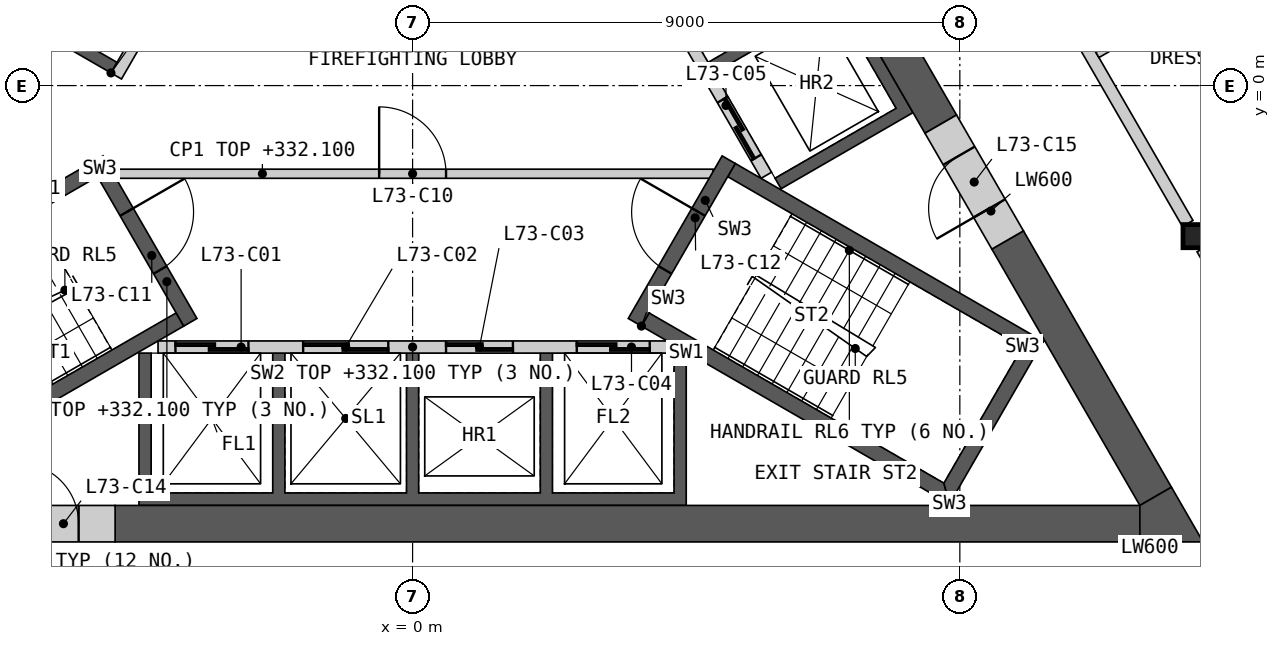
"""IFC4 building model, lengths in metres.
Left out: names, types, materials, properties, quantities, classifications, styles, units other than length and angle.
Written with IfcOpenShell. Run it as: python <this file> out.ifc"""

import sys

from ifc_helpers import new_model, si_unit, direction, frame, frame_2d, origin, origin_2d, place, context, subcontext, project, spatial, polyline, rectangle, i_section, outline, extrude, element, fill, save


model = new_model("IFC4")
c1 = context("Model", 3, precision=1e-05, world=origin(), true_north=direction((0.0, 1.0)))
c2 = subcontext(c1, "Body", "Model", "MODEL_VIEW")
j1 = project(units=[si_unit("LENGTHUNIT", "METRE"), si_unit("PLANEANGLEUNIT", "RADIAN")], contexts=[c1])
p1 = place(None, origin())
s1 = spatial("IfcSite", under=j1, at=p1, CompositionType="ELEMENT")
p2 = place(p1, origin())
s2 = spatial("IfcBuilding", under=s1, at=p2, CompositionType="ELEMENT")
p3 = place(p2, frame((0.0, 0.0, 329.0)))
s3 = spatial("IfcBuildingStorey", under=s2, at=p3, CompositionType="ELEMENT", Elevation=329.0)
p4 = place(p3, frame((12.868, -2.476, 0.0), z_axis=(0.0, 0.0, 1.0), x_axis=(1.0, 0.0, 0.0)))
e1 = element("IfcColumn", 1, at=p4, inside=s3, PredefinedType="COLUMN", context=c2, shape_type="SweptSolid", body=[
    extrude(i_section(OverallWidth=0.396, OverallDepth=0.381, WebThickness=0.019, FlangeThickness=0.03, at=origin_2d()), origin(), (0.0, 0.0, 1.0), 3.4),
])
p5 = place(p3, origin())
e2 = element("IfcWall", 2, at=p5, inside=s3, PredefinedType="SHEAR", context=c2, shape_type="SweptSolid", body=[
    extrude(outline(polyline([(4.5, -4.4), (4.5, -6.906), (-4.5, -6.906), (-4.5, -4.4), (-4.3, -4.4), (-4.3, -6.7), (-2.3, -6.7), (-2.3, -4.4), (-2.1, -4.4), (-2.1, -6.7), (-0.1, -6.7), (-0.1, -4.4), (0.1, -4.4), (0.1, -6.7), (2.1, -6.7), (2.1, -4.4), (2.3, -4.4), (2.3, -6.7), (4.3, -6.7), (4.3, -4.4), (4.5, -4.4)])), origin(), (0.0, 0.0, 1.0), 3.1),
])
p6 = place(p3, frame((-4.187, -4.3, 0.0), z_axis=(0.0, 0.0, 1.0), x_axis=(1.0, 0.0, 0.0)))
e3 = element("IfcWall", 3, at=p6, inside=s3, PredefinedType="SOLIDWALL", context=c2, shape_type="SweptSolid", body=[
    extrude(rectangle(XDim=8.373, YDim=0.2, at=frame_2d((4.187, 0.0))), origin(), (0.0, 0.0, 1.0), 3.1),
])
p7 = place(p6, frame((0.287, 0.0, 0.0)))
e4 = element("IfcOpeningElement", 4, at=p7, cuts=e3, PredefinedType="OPENING", context=c2, shape_type="SweptSolid", body=[
    extrude(rectangle(XDim=1.2, YDim=2.1, at=frame_2d((0.6, 1.05))), frame((0.0, 0.11, 0.0), z_axis=(0.0, -1.0, 0.0), x_axis=(1.0, 0.0, 0.0)), (0.0, 0.0, 1.0), 0.22),
])
p8 = place(p6, frame((2.387, 0.0, 0.0)))
e5 = element("IfcOpeningElement", 5, at=p8, cuts=e3, PredefinedType="OPENING", context=c2, shape_type="SweptSolid", body=[
    extrude(rectangle(XDim=1.4, YDim=2.1, at=frame_2d((0.7, 1.05))), frame((0.0, 0.11, 0.0), z_axis=(0.0, -1.0, 0.0), x_axis=(1.0, 0.0, 0.0)), (0.0, 0.0, 1.0), 0.22),
])
p9 = place(p6, frame((4.737, 0.0, 0.0)))
e6 = element("IfcOpeningElement", 6, at=p9, cuts=e3, PredefinedType="OPENING", context=c2, shape_type="SweptSolid", body=[
    extrude(rectangle(XDim=1.1, YDim=2.1, at=frame_2d((0.55, 1.05))), frame((0.0, 0.11, 0.0), z_axis=(0.0, -1.0, 0.0), x_axis=(1.0, 0.0, 0.0)), (0.0, 0.0, 1.0), 0.22),
])
p10 = place(p6, frame((6.887, 0.0, 0.0)))
e7 = element("IfcOpeningElement", 7, at=p10, cuts=e3, PredefinedType="OPENING", context=c2, shape_type="SweptSolid", body=[
    extrude(rectangle(XDim=1.2, YDim=2.1, at=frame_2d((0.6, 1.05))), frame((0.0, 0.11, 0.0), z_axis=(0.0, -1.0, 0.0), x_axis=(1.0, 0.0, 0.0)), (0.0, 0.0, 1.0), 0.22),
])
p11 = place(p3, origin())
e8 = element("IfcWall", 8, at=p11, inside=s3, PredefinedType="SHEAR", context=c2, shape_type="SweptSolid", body=[
    extrude(outline(polyline([(1.561, 6.097), (3.731, 7.35), (8.231, -0.444), (6.061, -1.697), (5.96, -1.524), (7.952, -0.374), (6.952, 1.358), (4.96, 0.208), (4.861, 0.381), (6.852, 1.531), (5.852, 3.263), (3.861, 2.113), (3.76, 2.287), (5.752, 3.437), (4.752, 5.169), (2.76, 4.019), (2.66, 4.192), (4.652, 5.342), (3.652, 7.074), (1.66, 5.924), (1.561, 6.097)])), origin(), (0.0, 0.0, 1.0), 3.1),
])
p12 = place(p3, frame((5.817, -1.476, 0.0), z_axis=(0.0, 0.0, 1.0), x_axis=(-0.500002616675, 0.866023893041, 0.0)))
e9 = element("IfcWall", 9, at=p12, inside=s3, PredefinedType="SOLIDWALL", context=c2, shape_type="SweptSolid", body=[
    extrude(rectangle(XDim=8.373, YDim=0.2, at=frame_2d((4.187, 0.0))), origin(), (0.0, 0.0, 1.0), 3.1),
])
p13 = place(p12, frame((0.337, 0.0, 0.0)))
e10 = element("IfcOpeningElement", 10, at=p13, cuts=e9, PredefinedType="OPENING", context=c2, shape_type="SweptSolid", body=[
    extrude(rectangle(XDim=1.1, YDim=2.1, at=frame_2d((0.55, 1.05))), frame((0.0, 0.11, 0.0), z_axis=(0.0, -1.0, 0.0), x_axis=(1.0, 0.0, 0.0)), (0.0, 0.0, 1.0), 0.22),
])
p14 = place(p12, frame((2.537, 0.0, 0.0)))
e11 = element("IfcOpeningElement", 11, at=p14, cuts=e9, PredefinedType="OPENING", context=c2, shape_type="SweptSolid", body=[
    extrude(rectangle(XDim=1.1, YDim=2.1, at=frame_2d((0.55, 1.05))), frame((0.0, 0.11, 0.0), z_axis=(0.0, -1.0, 0.0), x_axis=(1.0, 0.0, 0.0)), (0.0, 0.0, 1.0), 0.22),
])
p15 = place(p12, frame((4.737, 0.0, 0.0)))
e12 = element("IfcOpeningElement", 12, at=p15, cuts=e9, PredefinedType="OPENING", context=c2, shape_type="SweptSolid", body=[
    extrude(rectangle(XDim=1.1, YDim=2.1, at=frame_2d((0.55, 1.05))), frame((0.0, 0.11, 0.0), z_axis=(0.0, -1.0, 0.0), x_axis=(1.0, 0.0, 0.0)), (0.0, 0.0, 1.0), 0.22),
])
p16 = place(p12, frame((7.037, 0.0, 0.0)))
e13 = element("IfcOpeningElement", 13, at=p16, cuts=e9, PredefinedType="OPENING", context=c2, shape_type="SweptSolid", body=[
    extrude(rectangle(XDim=0.9, YDim=2.1, at=frame_2d((0.45, 1.05))), frame((0.0, 0.11, 0.0), z_axis=(0.0, -1.0, 0.0), x_axis=(1.0, 0.0, 0.0)), (0.0, 0.0, 1.0), 0.22),
])
p17 = place(p3, origin())
e14 = element("IfcWall", 14, at=p17, inside=s3, PredefinedType="SHEAR", context=c2, shape_type="SweptSolid", body=[
    extrude(outline(polyline([(-4.96, 0.208), (-7.131, 1.461), (-3.731, 7.35), (-1.561, 6.097), (-1.66, 5.924), (-3.652, 7.074), (-6.852, 1.531), (-4.861, 0.381), (-4.96, 0.208)])), origin(), (0.0, 0.0, 1.0), 3.1),
])
p18 = place(p3, frame((-1.631, 5.776, 0.0), z_axis=(0.0, 0.0, 1.0), x_axis=(-0.499992876559, -0.866029516466, 0.0)))
e15 = element("IfcWall", 15, at=p18, inside=s3, PredefinedType="SOLIDWALL", context=c2, shape_type="SweptSolid", body=[
    extrude(rectangle(XDim=6.486, YDim=0.2, at=frame_2d((3.243, 0.0))), origin(), (0.0, 0.0, 1.0), 3.1),
])
p19 = place(p18, frame((2.637, 0.0, 0.0)))
e16 = element("IfcOpeningElement", 16, at=p19, cuts=e15, PredefinedType="OPENING", context=c2, shape_type="SweptSolid", body=[
    extrude(rectangle(XDim=0.9, YDim=2.1, at=frame_2d((0.45, 1.05))), frame((0.0, 0.11, 0.0), z_axis=(0.0, -1.0, 0.0), x_axis=(1.0, 0.0, 0.0)), (0.0, 0.0, 1.0), 0.22),
])
p20 = place(p3, frame((-4.941, -1.45, 0.0), z_axis=(0.0, 0.0, 1.0), x_axis=(1.0, 0.0, 0.0)))
e17 = element("IfcWall", 17, at=p20, inside=s3, PredefinedType="PARTITIONING", context=c2, shape_type="SweptSolid", body=[
    extrude(rectangle(XDim=9.882, YDim=0.15, at=frame_2d((4.941, 0.0))), origin(), (0.0, 0.0, 1.0), 3.1),
])
p21 = place(p20, frame((4.391, 0.0, 0.0)))
e18 = element("IfcOpeningElement", 18, at=p21, cuts=e17, PredefinedType="OPENING", context=c2, shape_type="SweptSolid", body=[
    extrude(rectangle(XDim=1.1, YDim=2.1, at=frame_2d((0.55, 1.05))), frame((0.0, 0.085, 0.0), z_axis=(0.0, -1.0, 0.0), x_axis=(1.0, 0.0, 0.0)), (0.0, 0.0, 1.0), 0.17),
])
p22 = place(p3, origin())
e19 = element("IfcWall", 19, at=p22, inside=s3, PredefinedType="SHEAR", context=c2, shape_type="SweptSolid", body=[
    extrude(outline(polyline([(-5.307, -1.281), (-10.374, -4.206), (-10.032, -4.298), (-5.182, -1.498), (-5.307, -1.281)])), origin(), (0.0, 0.0, 1.0), 3.1),
])
p23 = place(p3, origin())
e20 = element("IfcWall", 20, at=p23, inside=s3, PredefinedType="SHEAR", context=c2, shape_type="SweptSolid", body=[
    extrude(outline(polyline([(-8.738, -6.539), (-8.83, -6.881), (-3.763, -3.956), (-3.888, -3.739), (-8.738, -6.539)])), origin(), (0.0, 0.0, 1.0), 3.1),
])
p24 = place(p3, frame((-5.199, -1.219, 0.0), z_axis=(0.0, 0.0, 1.0), x_axis=(0.499982516597, -0.866035497597, 0.0)))
e21 = element("IfcWall", 21, at=p24, inside=s3, PredefinedType="SHEAR", context=c2, shape_type="SweptSolid", body=[
    extrude(rectangle(XDim=3.088, YDim=0.25, at=frame_2d((1.544, 0.0))), origin(), (0.0, 0.0, 1.0), 3.1),
])
p25 = place(p24, frame((0.994, 0.0, 0.0)))
e22 = element("IfcOpeningElement", 22, at=p25, cuts=e21, PredefinedType="OPENING", context=c2, shape_type="SweptSolid", body=[
    extrude(rectangle(XDim=1.1, YDim=2.1, at=frame_2d((0.55, 1.05))), frame((0.0, 0.135, 0.0), z_axis=(0.0, -1.0, 0.0), x_axis=(1.0, 0.0, 0.0)), (0.0, 0.0, 1.0), 0.27),
])
p26 = place(p3, origin())
e23 = element("IfcWall", 23, at=p26, inside=s3, PredefinedType="SHEAR", context=c2, shape_type="SweptSolid", body=[
    extrude(outline(polyline([(3.763, -3.956), (8.83, -6.881), (8.738, -6.539), (3.888, -3.739), (3.763, -3.956)])), origin(), (0.0, 0.0, 1.0), 3.1),
])
p27 = place(p3, origin())
e24 = element("IfcWall", 24, at=p27, inside=s3, PredefinedType="SHEAR", context=c2, shape_type="SweptSolid", body=[
    extrude(outline(polyline([(8.83, -6.881), (10.374, -4.206), (10.032, -4.298), (8.738, -6.539), (8.83, -6.881)])), origin(), (0.0, 0.0, 1.0), 3.1),
])
p28 = place(p3, origin())
e25 = element("IfcWall", 25, at=p28, inside=s3, PredefinedType="SHEAR", context=c2, shape_type="SweptSolid", body=[
    extrude(outline(polyline([(10.032, -4.298), (10.374, -4.206), (5.307, -1.281), (5.182, -1.498), (10.032, -4.298)])), origin(), (0.0, 0.0, 1.0), 3.1),
])
p29 = place(p3, frame((3.655, -3.893, 0.0), z_axis=(0.0, 0.0, 1.0), x_axis=(0.499982516597, 0.866035497597, 0.0)))
e26 = element("IfcWall", 26, at=p29, inside=s3, PredefinedType="SHEAR", context=c2, shape_type="SweptSolid", body=[
    extrude(rectangle(XDim=3.088, YDim=0.25, at=frame_2d((1.544, 0.0))), origin(), (0.0, 0.0, 1.0), 3.1),
])
p30 = place(p29, frame((0.994, 0.0, 0.0)))
e27 = element("IfcOpeningElement", 27, at=p30, cuts=e26, PredefinedType="OPENING", context=c2, shape_type="SweptSolid", body=[
    extrude(rectangle(XDim=1.1, YDim=2.1, at=frame_2d((0.55, 1.05))), frame((0.0, 0.135, 0.0), z_axis=(0.0, -1.0, 0.0), x_axis=(1.0, 0.0, 0.0)), (0.0, 0.0, 1.0), 0.27),
])
for number, where, z_axis, x_axis in (
    (28, (-4.892, -7.206, 0.0), (0.0, 0.0, 1.0), (1.0, 0.0, 0.0)),
    (29, (8.686, -0.634, 0.0), (0.0, 0.0, 1.0), (-0.5, 0.866, 0.0)),
):
    element("IfcWall", number, at=place(p3, frame(where, z_axis=z_axis, x_axis=x_axis)), inside=s3, PredefinedType="SHEAR", context=c2, shape_type="SweptSolid", body=[
        extrude(rectangle(XDim=16.853, YDim=0.6, at=frame_2d((8.426, 0.0))), origin(), (0.0, 0.0, 1.0), 3.1),
    ])
p31 = place(p3, frame((12.221, -6.756, 0.0), z_axis=(0.0, 0.0, 1.0), x_axis=(-0.50000604952, 0.866021911064, 0.0)))
e30 = element("IfcWall", 30, at=p31, inside=s3, PredefinedType="SHEAR", context=c2, shape_type="SweptSolid", body=[
    extrude(rectangle(XDim=4.869, YDim=0.6, at=frame_2d((2.434, 0.0))), origin(), (0.0, 0.0, 1.0), 3.1),
])
p32 = place(p3, origin())
e31 = element("IfcWall", 31, at=p32, inside=s3, PredefinedType="SHEAR", context=c2, shape_type="SweptSolid", body=[
    extrude(outline(polyline([(11.961, -7.506), (11.961, -6.906), (12.48, -6.606), (13.0, -7.506), (11.961, -7.506)])), origin(), (0.0, 0.0, 1.0), 3.1),
])
p33 = place(p3, frame((-7.092, -7.206, 0.0), z_axis=(0.0, 0.0, 1.0), x_axis=(1.0, 0.0, 0.0)))
e32 = element("IfcWall", 32, at=p33, inside=s3, PredefinedType="SHEAR", context=c2, shape_type="SweptSolid", body=[
    extrude(rectangle(XDim=2.2, YDim=0.6, at=frame_2d((1.1, 0.0))), origin(), (0.0, 0.0, 1.0), 3.1),
])
p34 = place(p33, frame((0.6, 0.0, 0.0)))
e33 = element("IfcOpeningElement", 33, at=p34, cuts=e32, PredefinedType="OPENING", context=c2, shape_type="SweptSolid", body=[
    extrude(rectangle(XDim=1.0, YDim=2.1, at=frame_2d((0.5, 1.05))), frame((0.0, 0.31, 0.0), z_axis=(0.0, -1.0, 0.0), x_axis=(1.0, 0.0, 0.0)), (0.0, 0.0, 1.0), 0.62),
])
p35 = place(p3, frame((9.786, -2.539, 0.0), z_axis=(0.0, 0.0, 1.0), x_axis=(-0.499981787252, 0.866035918664, 0.0)))
e34 = element("IfcWall", 34, at=p35, inside=s3, PredefinedType="SHEAR", context=c2, shape_type="SweptSolid", body=[
    extrude(rectangle(XDim=2.2, YDim=0.6, at=frame_2d((1.1, 0.0))), origin(), (0.0, 0.0, 1.0), 3.1),
])
p36 = place(p35, frame((0.6, 0.0, 0.0)))
e35 = element("IfcOpeningElement", 35, at=p36, cuts=e34, PredefinedType="OPENING", context=c2, shape_type="SweptSolid", body=[
    extrude(rectangle(XDim=1.0, YDim=2.1, at=frame_2d((0.5, 1.05))), frame((0.0, 0.31, 0.0), z_axis=(0.0, -1.0, 0.0), x_axis=(1.0, 0.0, 0.0)), (0.0, 0.0, 1.0), 0.62),
])
p37 = place(p3, frame((8.698, 4.745, 0.0), z_axis=(0.0, 0.0, 1.0), x_axis=(0.499984266882, -0.866034487114, 0.0)))
e36 = element("IfcWall", 36, at=p37, inside=s3, PredefinedType="PARTITIONING", context=c2, shape_type="SweptSolid", body=[
    extrude(rectangle(XDim=8.099, YDim=0.2, at=frame_2d((4.049, 0.0))), origin(), (0.0, 0.0, 1.0), 3.1),
])
p38 = place(p37, frame((1.976, 0.0, 0.0)))
e37 = element("IfcOpeningElement", 37, at=p38, cuts=e36, PredefinedType="OPENING", context=c2, shape_type="SweptSolid", body=[
    extrude(rectangle(XDim=1.0, YDim=2.1, at=frame_2d((0.5, 1.05))), frame((0.0, 0.11, 0.0), z_axis=(0.0, -1.0, 0.0), x_axis=(1.0, 0.0, 0.0)), (0.0, 0.0, 1.0), 0.22),
])
p39 = place(p3, frame((12.988, -2.684, 0.0), z_axis=(0.0, 0.0, 1.0), x_axis=(0.49999094734, -0.866030630277, 0.0)))
e38 = element("IfcWall", 38, at=p39, inside=s3, PredefinedType="PARTITIONING", context=c2, shape_type="SweptSolid", body=[
    extrude(rectangle(XDim=4.513, YDim=0.2, at=frame_2d((2.256, 0.0))), origin(), (0.0, 0.0, 1.0), 3.1),
])
p40 = place(p39, frame((2.459, 0.0, 0.0)))
e39 = element("IfcOpeningElement", 39, at=p40, cuts=e38, PredefinedType="OPENING", context=c2, shape_type="SweptSolid", body=[
    extrude(rectangle(XDim=1.0, YDim=2.1, at=frame_2d((0.5, 1.05))), frame((0.0, 0.11, 0.0), z_axis=(0.0, -1.0, 0.0), x_axis=(1.0, 0.0, 0.0)), (0.0, 0.0, 1.0), 0.22),
])
p41 = place(p3, frame((11.262, 0.504, 0.0), z_axis=(0.0, 0.0, 1.0), x_axis=(0.866020217342, 0.500008983073, 0.0)))
e40 = element("IfcWall", 40, at=p41, inside=s3, PredefinedType="PARTITIONING", context=c2, shape_type="SweptSolid", body=[
    extrude(rectangle(XDim=7.966, YDim=0.1, at=frame_2d((3.983, 0.0))), origin(), (0.0, 0.0, 1.0), 2.33),
])
p42 = place(p41, frame((5.362, 0.0, 0.0)))
e41 = element("IfcOpeningElement", 41, at=p42, cuts=e40, PredefinedType="OPENING", context=c2, shape_type="SweptSolid", body=[
    extrude(rectangle(XDim=0.95, YDim=2.1, at=frame_2d((0.475, 1.05))), frame((0.0, 0.06, 0.0), z_axis=(0.0, -1.0, 0.0), x_axis=(1.0, 0.0, 0.0)), (0.0, 0.0, 1.0), 0.12),
])
p43 = place(p7, origin())
e42 = element("IfcDoor", 42, at=p43, inside=s3, OperationType="SLIDING_TO_LEFT", PredefinedType="DOOR", context=c2, shape_type="SweptSolid", body=[
    extrude(rectangle(XDim=1.2, YDim=2.1, at=frame_2d((0.6, 1.05))), frame((0.0, 0.025, 0.0), z_axis=(0.0, -1.0, 0.0), x_axis=(1.0, 0.0, 0.0)), (0.0, 0.0, 1.0), 0.05),
])
fill(e4, e42)
p44 = place(p8, origin())
e43 = element("IfcDoor", 43, at=p44, inside=s3, OperationType="SLIDING_TO_LEFT", PredefinedType="DOOR", context=c2, shape_type="SweptSolid", body=[
    extrude(rectangle(XDim=1.4, YDim=2.1, at=frame_2d((0.7, 1.05))), frame((0.0, 0.025, 0.0), z_axis=(0.0, -1.0, 0.0), x_axis=(1.0, 0.0, 0.0)), (0.0, 0.0, 1.0), 0.05),
])
fill(e5, e43)
p45 = place(p9, origin())
e44 = element("IfcDoor", 44, at=p45, inside=s3, OperationType="SLIDING_TO_LEFT", PredefinedType="DOOR", context=c2, shape_type="SweptSolid", body=[
    extrude(rectangle(XDim=1.1, YDim=2.1, at=frame_2d((0.55, 1.05))), frame((0.0, 0.025, 0.0), z_axis=(0.0, -1.0, 0.0), x_axis=(1.0, 0.0, 0.0)), (0.0, 0.0, 1.0), 0.05),
])
fill(e6, e44)
p46 = place(p10, origin())
e45 = element("IfcDoor", 45, at=p46, inside=s3, OperationType="SLIDING_TO_LEFT", PredefinedType="DOOR", context=c2, shape_type="SweptSolid", body=[
    extrude(rectangle(XDim=1.2, YDim=2.1, at=frame_2d((0.6, 1.05))), frame((0.0, 0.025, 0.0), z_axis=(0.0, -1.0, 0.0), x_axis=(1.0, 0.0, 0.0)), (0.0, 0.0, 1.0), 0.05),
])
fill(e7, e45)
p47 = place(p13, origin())
e46 = element("IfcDoor", 46, at=p47, inside=s3, OperationType="SLIDING_TO_LEFT", PredefinedType="DOOR", context=c2, shape_type="SweptSolid", body=[
    extrude(rectangle(XDim=1.1, YDim=2.1, at=frame_2d((0.55, 1.05))), frame((0.0, 0.025, 0.0), z_axis=(0.0, -1.0, 0.0), x_axis=(1.0, 0.0, 0.0)), (0.0, 0.0, 1.0), 0.05),
])
fill(e10, e46)
p48 = place(p21, origin())
e47 = element("IfcDoor", 47, at=p48, inside=s3, OperationType="SINGLE_SWING_LEFT", PredefinedType="DOOR", context=c2, shape_type="SweptSolid", body=[
    extrude(rectangle(XDim=1.1, YDim=2.1, at=frame_2d((0.55, 1.05))), frame((0.0, 0.025, 0.0), z_axis=(0.0, -1.0, 0.0), x_axis=(1.0, 0.0, 0.0)), (0.0, 0.0, 1.0), 0.05),
])
fill(e18, e47)
p49 = place(p25, origin())
e48 = element("IfcDoor", 48, at=p49, inside=s3, OperationType="SINGLE_SWING_LEFT", PredefinedType="DOOR", context=c2, shape_type="SweptSolid", body=[
    extrude(rectangle(XDim=1.1, YDim=2.1, at=frame_2d((0.55, 1.05))), frame((0.0, 0.025, 0.0), z_axis=(0.0, -1.0, 0.0), x_axis=(1.0, 0.0, 0.0)), (0.0, 0.0, 1.0), 0.05),
])
fill(e22, e48)
p50 = place(p30, origin())
e49 = element("IfcDoor", 49, at=p50, inside=s3, OperationType="SINGLE_SWING_RIGHT", PredefinedType="DOOR", context=c2, shape_type="SweptSolid", body=[
    extrude(rectangle(XDim=1.1, YDim=2.1, at=frame_2d((0.55, 1.05))), frame((0.0, 0.025, 0.0), z_axis=(0.0, -1.0, 0.0), x_axis=(1.0, 0.0, 0.0)), (0.0, 0.0, 1.0), 0.05),
])
fill(e27, e49)
p51 = place(p34, origin())
e50 = element("IfcDoor", 50, at=p51, inside=s3, OperationType="SINGLE_SWING_LEFT", PredefinedType="DOOR", context=c2, shape_type="SweptSolid", body=[
    extrude(rectangle(XDim=1.0, YDim=2.1, at=frame_2d((0.5, 1.05))), frame((0.0, 0.055, 0.0), z_axis=(0.0, -1.0, 0.0), x_axis=(1.0, 0.0, 0.0)), (0.0, 0.0, 1.0), 0.05),
])
fill(e33, e50)
p52 = place(p36, origin())
e51 = element("IfcDoor", 51, at=p52, inside=s3, OperationType="SINGLE_SWING_LEFT", PredefinedType="DOOR", context=c2, shape_type="SweptSolid", body=[
    extrude(rectangle(XDim=1.0, YDim=2.1, at=frame_2d((0.5, 1.05))), frame((0.0, 0.055, 0.0), z_axis=(0.0, -1.0, 0.0), x_axis=(1.0, 0.0, 0.0)), (0.0, 0.0, 1.0), 0.05),
])
fill(e35, e51)
save(model, sys.argv[1])
